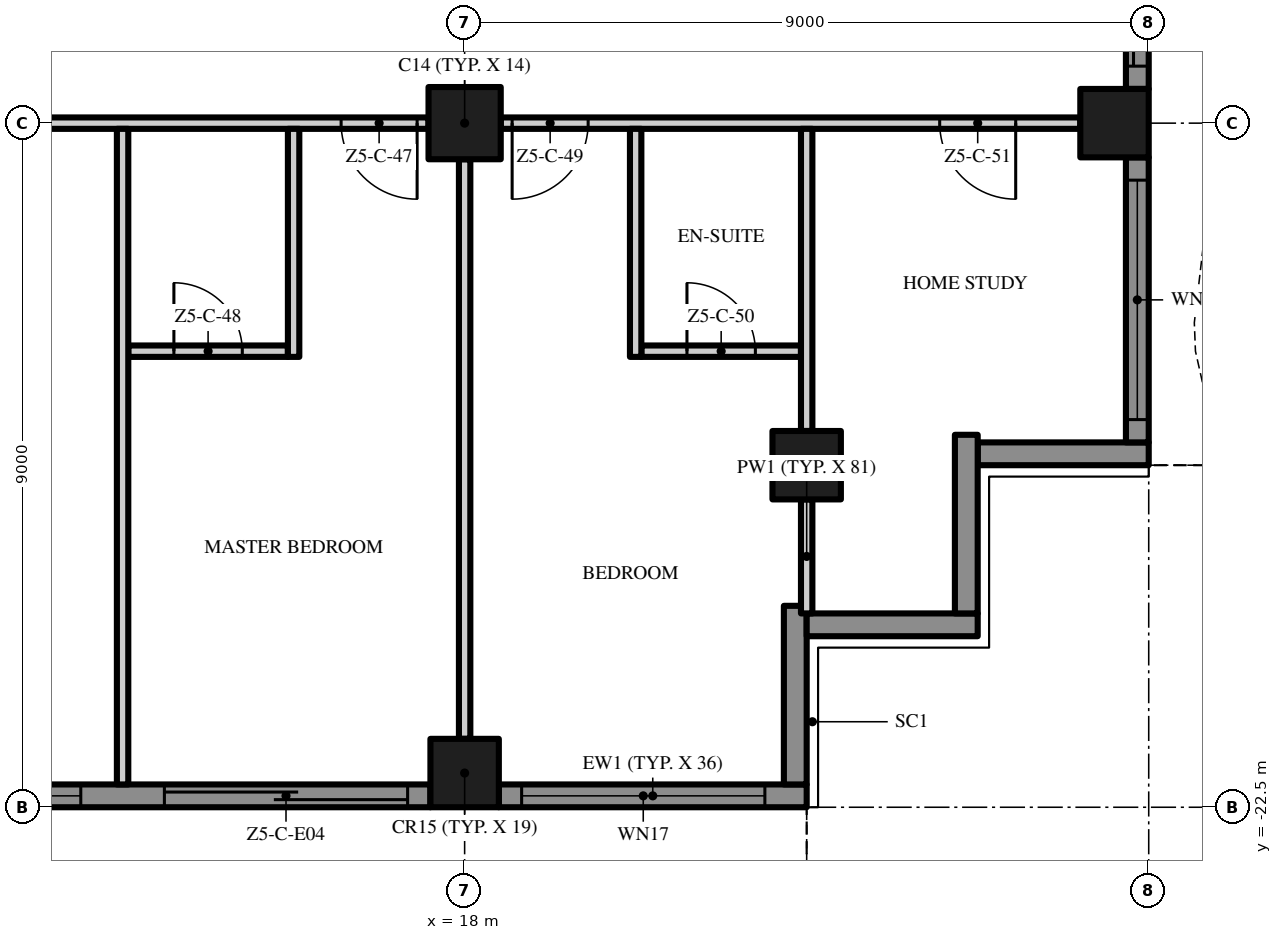
"""IFC4 building model, lengths in metres.
Left out: names, types, materials, properties, quantities, classifications, styles, units other than length and angle.
Written with IfcOpenShell. Run it as: python <this file> out.ifc"""

import sys

from ifc_helpers import new_model, si_unit, direction, frame, frame_2d, origin, origin_2d, place, context, subcontext, project, spatial, polyline, rectangle, outline, extrude, element, fill, save


model = new_model("IFC4")
c1 = context("Model", 3, precision=1e-05, world=origin(), true_north=direction((0.0, 1.0)))
c2 = subcontext(c1, "Body", "Model", "MODEL_VIEW")
j1 = project(units=[si_unit("LENGTHUNIT", "METRE"), si_unit("PLANEANGLEUNIT", "RADIAN")], contexts=[c1])
p1 = place(None, origin())
s1 = spatial("IfcSite", under=j1, at=p1, CompositionType="ELEMENT")
p2 = place(p1, origin())
s2 = spatial("IfcBuilding", under=s1, at=p2, CompositionType="ELEMENT")
p3 = place(p2, frame((0.0, 0.0, 261.6)))
s3 = spatial("IfcBuildingStorey", under=s2, at=p3, CompositionType="ELEMENT", Elevation=261.6)
p4 = place(p3, frame((18.0, -13.5, 0.0), z_axis=(0.0, 0.0, 1.0), x_axis=(1.0, 0.0, 0.0)))
e1 = element("IfcColumn", 1, at=p4, inside=s3, PredefinedType="COLUMN", context=c2, shape_type="SweptSolid", body=[
    extrude(rectangle(XDim=0.95, YDim=0.95, at=origin_2d()), origin(), (0.0, 0.0, 1.0), 3.5),
])
for number, where, z_axis, x_axis in (
    (2, (18.0, -22.05, 0.0), (0.0, 0.0, 1.0), (1.0, 0.0, 0.0)),
    (3, (26.55, -13.5, 0.0), (0.0, 0.0, 1.0), (1.0, 0.0, 0.0)),
    (4, (22.5, -18.0, 0.0), (0.0, 0.0, 1.0), (1.0, 0.0, 0.0)),
):
    element("IfcColumn", number, at=place(p3, frame(where, z_axis=z_axis, x_axis=x_axis)), inside=s3, PredefinedType="COLUMN", context=c2, shape_type="SweptSolid", body=[
        extrude(rectangle(XDim=0.9, YDim=0.9, at=origin_2d()), origin(), (0.0, 0.0, 1.0), 3.5),
    ])
p5 = place(p3, frame((17.55, -22.35, 0.0), z_axis=(0.0, 0.0, 1.0), x_axis=(-1.0, 0.0, 0.0)))
e5 = element("IfcWall", 5, at=p5, inside=s3, PredefinedType="SOLIDWALL", context=c2, shape_type="SweptSolid", body=[
    extrude(rectangle(XDim=8.1, YDim=0.3, at=frame_2d((4.05, 0.0))), origin(), (0.0, 0.0, 1.0), 3.5),
])
p6 = place(p5, frame((4.6, 0.0, 0.45)))
e6 = element("IfcOpeningElement", 6, at=p6, cuts=e5, PredefinedType="OPENING", context=c2, shape_type="SweptSolid", body=[
    extrude(rectangle(XDim=3.2, YDim=2.65, at=frame_2d((1.6, 1.325))), frame((0.0, 0.16, 0.0), z_axis=(0.0, -1.0, 0.0), x_axis=(1.0, 0.0, 0.0)), (0.0, 0.0, 1.0), 0.32),
])
p7 = place(p5, frame((0.3, 0.0, 0.0)))
e7 = element("IfcOpeningElement", 7, at=p7, cuts=e5, PredefinedType="OPENING", context=c2, shape_type="SweptSolid", body=[
    extrude(rectangle(XDim=3.2, YDim=2.4, at=frame_2d((1.6, 1.2))), frame((0.0, 0.16, 0.0), z_axis=(0.0, -1.0, 0.0), x_axis=(1.0, 0.0, 0.0)), (0.0, 0.0, 1.0), 0.32),
])
p8 = place(p3, frame((22.5, -22.35, 0.0), z_axis=(0.0, 0.0, 1.0), x_axis=(-1.0, 0.0, 0.0)))
e8 = element("IfcWall", 8, at=p8, inside=s3, PredefinedType="SOLIDWALL", context=c2, shape_type="SweptSolid", body=[
    extrude(rectangle(XDim=4.05, YDim=0.3, at=frame_2d((2.025, 0.0))), origin(), (0.0, 0.0, 1.0), 3.5),
])
p9 = place(p8, frame((0.55, 0.0, 0.45)))
e9 = element("IfcOpeningElement", 9, at=p9, cuts=e8, PredefinedType="OPENING", context=c2, shape_type="SweptSolid", body=[
    extrude(rectangle(XDim=3.2, YDim=2.65, at=frame_2d((1.6, 1.325))), frame((0.0, 0.16, 0.0), z_axis=(0.0, -1.0, 0.0), x_axis=(1.0, 0.0, 0.0)), (0.0, 0.0, 1.0), 0.32),
])
p10 = place(p3, frame((22.35, -19.85, 0.0), z_axis=(0.0, 0.0, 1.0), x_axis=(0.0, -1.0, 0.0)))
e10 = element("IfcWall", 10, at=p10, inside=s3, PredefinedType="SOLIDWALL", context=c2, shape_type="SweptSolid", body=[
    extrude(rectangle(XDim=2.35, YDim=0.3, at=frame_2d((1.175, 0.0))), origin(), (0.0, 0.0, 1.0), 3.5),
])
p11 = place(p3, frame((24.75, -20.1, 0.0), z_axis=(0.0, 0.0, 1.0), x_axis=(-1.0, 0.0, 0.0)))
e11 = element("IfcWall", 11, at=p11, inside=s3, PredefinedType="SOLIDWALL", context=c2, shape_type="SweptSolid", body=[
    extrude(rectangle(XDim=2.25, YDim=0.3, at=frame_2d((1.125, 0.0))), origin(), (0.0, 0.0, 1.0), 3.5),
])
p12 = place(p3, frame((24.6, -17.6, 0.0), z_axis=(0.0, 0.0, 1.0), x_axis=(0.0, -1.0, 0.0)))
e12 = element("IfcWall", 12, at=p12, inside=s3, PredefinedType="SOLIDWALL", context=c2, shape_type="SweptSolid", body=[
    extrude(rectangle(XDim=2.35, YDim=0.3, at=frame_2d((1.175, 0.0))), origin(), (0.0, 0.0, 1.0), 3.5),
])
p13 = place(p3, frame((27.0, -17.85, 0.0), z_axis=(0.0, 0.0, 1.0), x_axis=(-1.0, 0.0, 0.0)))
e13 = element("IfcWall", 13, at=p13, inside=s3, PredefinedType="SOLIDWALL", context=c2, shape_type="SweptSolid", body=[
    extrude(rectangle(XDim=2.25, YDim=0.3, at=frame_2d((1.125, 0.0))), origin(), (0.0, 0.0, 1.0), 3.5),
])
p14 = place(p3, frame((26.85, -13.95, 0.0), z_axis=(0.0, 0.0, 1.0), x_axis=(0.0, -1.0, 0.0)))
e14 = element("IfcWall", 14, at=p14, inside=s3, PredefinedType="SOLIDWALL", context=c2, shape_type="SweptSolid", body=[
    extrude(rectangle(XDim=3.75, YDim=0.3, at=frame_2d((1.875, 0.0))), origin(), (0.0, 0.0, 1.0), 3.5),
])
p15 = place(p14, frame((0.3, 0.0, 0.45)))
e15 = element("IfcOpeningElement", 15, at=p15, cuts=e14, PredefinedType="OPENING", context=c2, shape_type="SweptSolid", body=[
    extrude(rectangle(XDim=3.15, YDim=2.65, at=frame_2d((1.575, 1.325))), frame((0.0, 0.16, 0.0), z_axis=(0.0, -1.0, 0.0), x_axis=(1.0, 0.0, 0.0)), (0.0, 0.0, 1.0), 0.32),
])
p16 = place(p3, frame((26.85, -4.95, 0.0), z_axis=(0.0, 0.0, 1.0), x_axis=(0.0, -1.0, 0.0)))
e16 = element("IfcWall", 16, at=p16, inside=s3, PredefinedType="SOLIDWALL", context=c2, shape_type="SweptSolid", body=[
    extrude(rectangle(XDim=8.1, YDim=0.3, at=frame_2d((4.05, 0.0))), origin(), (0.0, 0.0, 1.0), 3.5),
])
p17 = place(p16, frame((4.6, 0.0, 0.0)))
e17 = element("IfcOpeningElement", 17, at=p17, cuts=e16, PredefinedType="OPENING", context=c2, shape_type="SweptSolid", body=[
    extrude(rectangle(XDim=3.2, YDim=2.4, at=frame_2d((1.6, 1.2))), frame((0.0, 0.16, 0.0), z_axis=(0.0, -1.0, 0.0), x_axis=(1.0, 0.0, 0.0)), (0.0, 0.0, 1.0), 0.32),
])
p18 = place(p16, frame((0.3, 0.0, 0.0)))
e18 = element("IfcOpeningElement", 18, at=p18, cuts=e16, PredefinedType="OPENING", context=c2, shape_type="SweptSolid", body=[
    extrude(rectangle(XDim=3.2, YDim=2.4, at=frame_2d((1.6, 1.2))), frame((0.0, 0.16, 0.0), z_axis=(0.0, -1.0, 0.0), x_axis=(1.0, 0.0, 0.0)), (0.0, 0.0, 1.0), 0.32),
])
p19 = place(p3, origin())
e19 = element("IfcWall", 19, at=p19, inside=s3, PredefinedType="USERDEFINED", context=c2, shape_type="SweptSolid", body=[
    extrude(outline(polyline([(-22.5, -23.451), (-21.0, -23.115), (-20.625, -23.1), (-19.5, -23.231), (-18.0, -23.755), (-16.5, -24.488), (-15.0, -25.149), (-13.5, -25.485), (-13.125, -25.5), (-12.0, -25.369), (-10.5, -24.845), (-9.0, -24.112), (-7.5, -23.451), (-6.0, -23.115), (-5.625, -23.1), (-4.5, -23.231), (-3.0, -23.755), (-1.5, -24.488), (0.0, -25.149), (1.5, -25.485), (1.875, -25.5), (3.0, -25.369), (4.5, -24.845), (6.0, -24.112), (7.5, -23.451), (9.0, -23.115), (9.375, -23.1), (10.5, -23.231), (12.0, -23.755), (13.5, -24.488), (15.0, -25.149), (16.5, -25.485), (16.875, -25.5), (18.0, -25.369), (19.5, -24.845), (21.0, -24.112), (22.5, -23.451), (22.399, -23.223), (20.895, -23.885), (19.404, -24.614), (17.944, -25.124), (16.865, -25.249), (16.533, -25.236), (15.079, -24.91), (13.605, -24.261), (12.096, -23.524), (10.556, -22.986), (9.385, -22.849), (8.967, -22.866), (7.421, -23.213), (5.895, -23.885), (4.404, -24.614), (2.944, -25.124), (1.865, -25.249), (1.533, -25.236), (0.079, -24.91), (-1.395, -24.261), (-2.904, -23.524), (-4.444, -22.986), (-5.615, -22.849), (-6.033, -22.866), (-7.579, -23.213), (-9.105, -23.885), (-10.596, -24.614), (-12.056, -25.124), (-13.135, -25.249), (-13.467, -25.236), (-14.921, -24.91), (-16.395, -24.261), (-17.904, -23.524), (-19.444, -22.986), (-20.615, -22.849), (-21.033, -22.866), (-22.555, -23.208), (-22.5, -23.451)])), origin(), (0.0, 0.0, 1.0), 0.9),
])
p20 = place(p3, origin())
e20 = element("IfcWall", 20, at=p20, inside=s3, PredefinedType="USERDEFINED", context=c2, shape_type="SweptSolid", body=[
    extrude(outline(polyline([(27.951, -18.0), (27.615, -16.5), (27.6, -16.125), (27.731, -15.0), (28.255, -13.5), (28.988, -12.0), (29.649, -10.5), (29.985, -9.0), (30.0, -8.625), (29.869, -7.5), (29.345, -6.0), (28.612, -4.5), (27.951, -3.0), (27.615, -1.5), (27.6, -1.125), (27.731, 0.0), (28.255, 1.5), (28.988, 3.0), (29.649, 4.5), (29.985, 6.0), (30.0, 6.375), (29.869, 7.5), (29.345, 9.0), (28.612, 10.5), (27.951, 12.0), (27.615, 13.5), (27.6, 13.875), (27.731, 15.0), (28.255, 16.5), (28.988, 18.0), (28.763, 18.11), (28.024, 16.596), (27.486, 15.056), (27.349, 13.885), (27.366, 13.467), (27.713, 11.921), (28.385, 10.395), (29.114, 8.904), (29.624, 7.444), (29.749, 6.365), (29.736, 6.033), (29.41, 4.579), (28.761, 3.105), (28.024, 1.596), (27.486, 0.056), (27.349, -1.115), (27.366, -1.533), (27.713, -3.079), (28.385, -4.605), (29.114, -6.096), (29.624, -7.556), (29.749, -8.635), (29.736, -8.967), (29.41, -10.421), (28.761, -11.895), (28.024, -13.404), (27.486, -14.944), (27.349, -16.115), (27.366, -16.533), (27.708, -18.055), (27.951, -18.0)])), origin(), (0.0, 0.0, 1.0), 0.9),
])
p21 = place(p3, frame((13.575, -16.5, 0.0), z_axis=(0.0, 0.0, 1.0), x_axis=(1.0, 0.0, 0.0)))
e21 = element("IfcWall", 21, at=p21, inside=s3, PredefinedType="PARTITIONING", context=c2, shape_type="SweptSolid", body=[
    extrude(rectangle(XDim=2.1, YDim=0.15, at=frame_2d((1.05, 0.0))), origin(), (0.0, 0.0, 1.0), 3.5),
])
p22 = place(p21, frame((0.6, 0.0, 0.0)))
e22 = element("IfcOpeningElement", 22, at=p22, cuts=e21, PredefinedType="OPENING", context=c2, shape_type="SweptSolid", body=[
    extrude(rectangle(XDim=0.9, YDim=2.1, at=frame_2d((0.45, 1.05))), frame((0.0, 0.085, 0.0), z_axis=(0.0, -1.0, 0.0), x_axis=(1.0, 0.0, 0.0)), (0.0, 0.0, 1.0), 0.17),
])
p23 = place(p3, frame((20.325, -16.5, 0.0), z_axis=(0.0, 0.0, 1.0), x_axis=(1.0, 0.0, 0.0)))
e23 = element("IfcWall", 23, at=p23, inside=s3, PredefinedType="PARTITIONING", context=c2, shape_type="SweptSolid", body=[
    extrude(rectangle(XDim=2.1, YDim=0.15, at=frame_2d((1.05, 0.0))), origin(), (0.0, 0.0, 1.0), 3.5),
])
p24 = place(p23, frame((0.6, 0.0, 0.0)))
e24 = element("IfcOpeningElement", 24, at=p24, cuts=e23, PredefinedType="OPENING", context=c2, shape_type="SweptSolid", body=[
    extrude(rectangle(XDim=0.9, YDim=2.1, at=frame_2d((0.45, 1.05))), frame((0.0, 0.085, 0.0), z_axis=(0.0, -1.0, 0.0), x_axis=(1.0, 0.0, 0.0)), (0.0, 0.0, 1.0), 0.17),
])
p25 = place(p3, frame((17.525, -13.5, 0.0), z_axis=(0.0, 0.0, 1.0), x_axis=(-1.0, 0.0, 0.0)))
e25 = element("IfcWall", 25, at=p25, inside=s3, PredefinedType="PARTITIONING", context=c2, shape_type="SweptSolid", body=[
    extrude(rectangle(XDim=8.05, YDim=0.15, at=frame_2d((4.025, 0.0))), origin(), (0.0, 0.0, 1.0), 3.5),
])
p26 = place(p25, frame((6.1, 0.0, 0.0)))
e26 = element("IfcOpeningElement", 26, at=p26, cuts=e25, PredefinedType="OPENING", context=c2, shape_type="SweptSolid", body=[
    extrude(rectangle(XDim=1.8, YDim=2.4, at=frame_2d((0.9, 1.2))), frame((0.0, 0.085, 0.0), z_axis=(0.0, -1.0, 0.0), x_axis=(1.0, 0.0, 0.0)), (0.0, 0.0, 1.0), 0.17),
])
p27 = place(p25, frame((0.15, 0.0, 0.0)))
e27 = element("IfcOpeningElement", 27, at=p27, cuts=e25, PredefinedType="OPENING", context=c2, shape_type="SweptSolid", body=[
    extrude(rectangle(XDim=1.0, YDim=2.4, at=frame_2d((0.5, 1.2))), frame((0.0, 0.085, 0.0), z_axis=(0.0, -1.0, 0.0), x_axis=(1.0, 0.0, 0.0)), (0.0, 0.0, 1.0), 0.17),
])
p28 = place(p3, frame((26.1, -13.5, 0.0), z_axis=(0.0, 0.0, 1.0), x_axis=(-1.0, 0.0, 0.0)))
e28 = element("IfcWall", 28, at=p28, inside=s3, PredefinedType="PARTITIONING", context=c2, shape_type="SweptSolid", body=[
    extrude(rectangle(XDim=7.625, YDim=0.15, at=frame_2d((3.812, 0.0))), origin(), (0.0, 0.0, 1.0), 3.5),
])
p29 = place(p28, frame((6.475, 0.0, 0.0)))
e29 = element("IfcOpeningElement", 29, at=p29, cuts=e28, PredefinedType="OPENING", context=c2, shape_type="SweptSolid", body=[
    extrude(rectangle(XDim=1.0, YDim=2.4, at=frame_2d((0.5, 1.2))), frame((0.0, 0.085, 0.0), z_axis=(0.0, -1.0, 0.0), x_axis=(1.0, 0.0, 0.0)), (0.0, 0.0, 1.0), 0.17),
])
p30 = place(p28, frame((0.85, 0.0, 0.0)))
e30 = element("IfcOpeningElement", 30, at=p30, cuts=e28, PredefinedType="OPENING", context=c2, shape_type="SweptSolid", body=[
    extrude(rectangle(XDim=1.0, YDim=2.4, at=frame_2d((0.5, 1.2))), frame((0.0, 0.085, 0.0), z_axis=(0.0, -1.0, 0.0), x_axis=(1.0, 0.0, 0.0)), (0.0, 0.0, 1.0), 0.17),
])
p31 = place(p3, frame((13.5, -22.2, 0.0), z_axis=(0.0, 0.0, 1.0), x_axis=(0.0, 1.0, 0.0)))
e31 = element("IfcWall", 31, at=p31, inside=s3, PredefinedType="PARTITIONING", context=c2, shape_type="SweptSolid", body=[
    extrude(rectangle(XDim=8.625, YDim=0.15, at=frame_2d((4.312, 0.0))), origin(), (0.0, 0.0, 1.0), 3.5),
])
p32 = place(p3, frame((15.75, -16.575, 0.0), z_axis=(0.0, 0.0, 1.0), x_axis=(0.0, 1.0, 0.0)))
e32 = element("IfcWall", 32, at=p32, inside=s3, PredefinedType="PARTITIONING", context=c2, shape_type="SweptSolid", body=[
    extrude(rectangle(XDim=3.0, YDim=0.15, at=frame_2d((1.5, 0.0))), origin(), (0.0, 0.0, 1.0), 3.5),
])
p33 = place(p3, frame((18.0, -21.6, 0.0), z_axis=(0.0, 0.0, 1.0), x_axis=(0.0, 1.0, 0.0)))
e33 = element("IfcWall", 33, at=p33, inside=s3, PredefinedType="PARTITIONING", context=c2, shape_type="SweptSolid", body=[
    extrude(rectangle(XDim=7.625, YDim=0.15, at=frame_2d((3.812, 0.0))), origin(), (0.0, 0.0, 1.0), 3.5),
])
p34 = place(p3, frame((20.25, -16.575, 0.0), z_axis=(0.0, 0.0, 1.0), x_axis=(0.0, 1.0, 0.0)))
e34 = element("IfcWall", 34, at=p34, inside=s3, PredefinedType="PARTITIONING", context=c2, shape_type="SweptSolid", body=[
    extrude(rectangle(XDim=3.0, YDim=0.15, at=frame_2d((1.5, 0.0))), origin(), (0.0, 0.0, 1.0), 3.5),
])
p35 = place(p3, frame((22.5, -19.95, 0.0), z_axis=(0.0, 0.0, 1.0), x_axis=(0.0, 1.0, 0.0)))
e35 = element("IfcWall", 35, at=p35, inside=s3, PredefinedType="PARTITIONING", context=c2, shape_type="SweptSolid", body=[
    extrude(rectangle(XDim=1.5, YDim=0.15, at=frame_2d((0.75, 0.0))), origin(), (0.0, 0.0, 1.0), 3.5),
])
p36 = place(p3, frame((22.5, -17.55, 0.0), z_axis=(0.0, 0.0, 1.0), x_axis=(0.0, 1.0, 0.0)))
e36 = element("IfcWall", 36, at=p36, inside=s3, PredefinedType="PARTITIONING", context=c2, shape_type="SweptSolid", body=[
    extrude(rectangle(XDim=3.975, YDim=0.15, at=frame_2d((1.988, 0.0))), origin(), (0.0, 0.0, 1.0), 3.5),
])
p37 = place(p6, origin())
e37 = element("IfcWindow", 37, at=p37, inside=s3, PartitioningType="SINGLE_PANEL", PredefinedType="WINDOW", context=c2, shape_type="SweptSolid", body=[
    extrude(rectangle(XDim=3.2, YDim=2.65, at=frame_2d((1.6, 1.325))), frame((0.0, 0.03, 0.0), z_axis=(0.0, -1.0, 0.0), x_axis=(1.0, 0.0, 0.0)), (0.0, 0.0, 1.0), 0.06),
])
fill(e6, e37)
p38 = place(p7, origin())
e38 = element("IfcDoor", 38, at=p38, inside=s3, OperationType="SINGLE_SWING_LEFT", PredefinedType="DOOR", context=c2, shape_type="SweptSolid", body=[
    extrude(rectangle(XDim=3.2, YDim=2.4, at=frame_2d((1.6, 1.2))), frame((0.0, 0.025, 0.0), z_axis=(0.0, -1.0, 0.0), x_axis=(1.0, 0.0, 0.0)), (0.0, 0.0, 1.0), 0.05),
])
fill(e7, e38)
p39 = place(p9, origin())
e39 = element("IfcWindow", 39, at=p39, inside=s3, PartitioningType="SINGLE_PANEL", PredefinedType="WINDOW", context=c2, shape_type="SweptSolid", body=[
    extrude(rectangle(XDim=3.2, YDim=2.65, at=frame_2d((1.6, 1.325))), frame((0.0, 0.03, 0.0), z_axis=(0.0, -1.0, 0.0), x_axis=(1.0, 0.0, 0.0)), (0.0, 0.0, 1.0), 0.06),
])
fill(e9, e39)
p40 = place(p15, origin())
e40 = element("IfcWindow", 40, at=p40, inside=s3, PartitioningType="SINGLE_PANEL", PredefinedType="WINDOW", context=c2, shape_type="SweptSolid", body=[
    extrude(rectangle(XDim=3.15, YDim=2.65, at=frame_2d((1.575, 1.325))), frame((0.0, 0.03, 0.0), z_axis=(0.0, -1.0, 0.0), x_axis=(1.0, 0.0, 0.0)), (0.0, 0.0, 1.0), 0.06),
])
fill(e15, e40)
p41 = place(p17, origin())
e41 = element("IfcDoor", 41, at=p41, inside=s3, OperationType="SINGLE_SWING_LEFT", PredefinedType="DOOR", context=c2, shape_type="SweptSolid", body=[
    extrude(rectangle(XDim=3.2, YDim=2.4, at=frame_2d((1.6, 1.2))), frame((0.0, 0.025, 0.0), z_axis=(0.0, -1.0, 0.0), x_axis=(1.0, 0.0, 0.0)), (0.0, 0.0, 1.0), 0.05),
])
fill(e17, e41)
p42 = place(p27, origin())
e42 = element("IfcDoor", 42, at=p42, inside=s3, OperationType="SINGLE_SWING_LEFT", PredefinedType="DOOR", context=c2, shape_type="SweptSolid", body=[
    extrude(rectangle(XDim=1.0, YDim=2.4, at=frame_2d((0.5, 1.2))), frame((0.0, 0.025, 0.0), z_axis=(0.0, -1.0, 0.0), x_axis=(1.0, 0.0, 0.0)), (0.0, 0.0, 1.0), 0.05),
])
fill(e27, e42)
p43 = place(p22, origin())
e43 = element("IfcDoor", 43, at=p43, inside=s3, OperationType="SINGLE_SWING_LEFT", PredefinedType="DOOR", context=c2, shape_type="SweptSolid", body=[
    extrude(rectangle(XDim=0.9, YDim=2.1, at=frame_2d((0.45, 1.05))), frame((0.0, 0.025, 0.0), z_axis=(0.0, -1.0, 0.0), x_axis=(1.0, 0.0, 0.0)), (0.0, 0.0, 1.0), 0.05),
])
fill(e22, e43)
p44 = place(p29, origin())
e44 = element("IfcDoor", 44, at=p44, inside=s3, OperationType="SINGLE_SWING_RIGHT", PredefinedType="DOOR", context=c2, shape_type="SweptSolid", body=[
    extrude(rectangle(XDim=1.0, YDim=2.4, at=frame_2d((0.5, 1.2))), frame((0.0, 0.025, 0.0), z_axis=(0.0, -1.0, 0.0), x_axis=(1.0, 0.0, 0.0)), (0.0, 0.0, 1.0), 0.05),
])
fill(e29, e44)
p45 = place(p24, origin())
e45 = element("IfcDoor", 45, at=p45, inside=s3, OperationType="SINGLE_SWING_LEFT", PredefinedType="DOOR", context=c2, shape_type="SweptSolid", body=[
    extrude(rectangle(XDim=0.9, YDim=2.1, at=frame_2d((0.45, 1.05))), frame((0.0, 0.025, 0.0), z_axis=(0.0, -1.0, 0.0), x_axis=(1.0, 0.0, 0.0)), (0.0, 0.0, 1.0), 0.05),
])
fill(e24, e45)
p46 = place(p30, origin())
e46 = element("IfcDoor", 46, at=p46, inside=s3, OperationType="SINGLE_SWING_LEFT", PredefinedType="DOOR", context=c2, shape_type="SweptSolid", body=[
    extrude(rectangle(XDim=1.0, YDim=2.4, at=frame_2d((0.5, 1.2))), frame((0.0, 0.025, 0.0), z_axis=(0.0, -1.0, 0.0), x_axis=(1.0, 0.0, 0.0)), (0.0, 0.0, 1.0), 0.05),
])
fill(e30, e46)
save(model, sys.argv[1])
